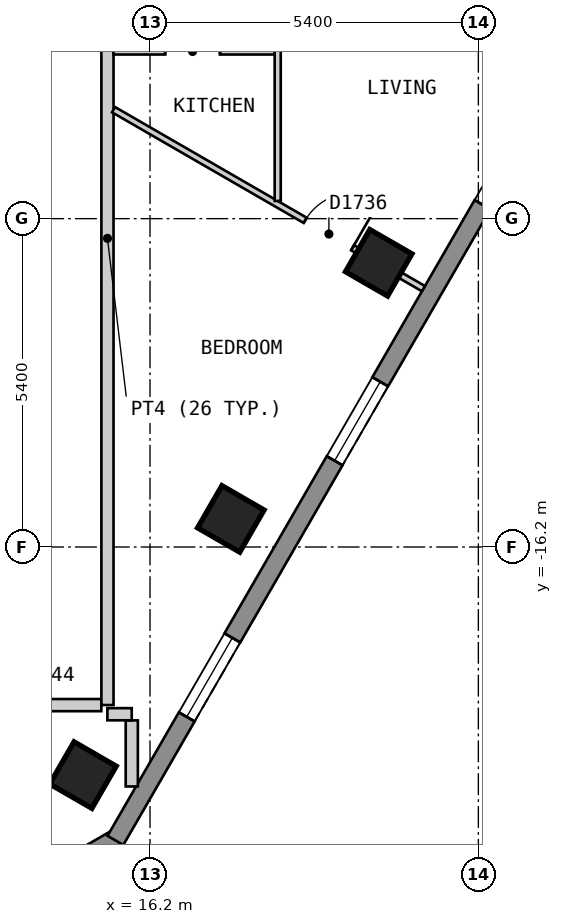
"""IFC4 building model, lengths in metres.
Left out: names, types, materials, properties, quantities, classifications, styles, units other than length and angle.
Written with IfcOpenShell. Run it as: python <this file> out.ifc"""

import sys

from ifc_helpers import new_model, si_unit, direction, frame, frame_2d, origin, origin_2d, place, context, subcontext, project, spatial, polyline, rectangle, outline, extrude, element, fill, save


model = new_model("IFC4")
c1 = context("Model", 3, precision=1e-05, world=origin(), true_north=direction((0.0, 1.0)))
c2 = subcontext(c1, "Body", "Model", "MODEL_VIEW")
j1 = project(units=[si_unit("LENGTHUNIT", "METRE"), si_unit("PLANEANGLEUNIT", "RADIAN")], contexts=[c1])
p1 = place(None, origin())
s1 = spatial("IfcSite", under=j1, at=p1, CompositionType="ELEMENT")
p2 = place(p1, origin())
s2 = spatial("IfcBuilding", under=s1, at=p2, CompositionType="ELEMENT")
p3 = place(p2, frame((0.0, 0.0, 187.2)))
s3 = spatial("IfcBuildingStorey", under=s2, at=p3, CompositionType="ELEMENT", Elevation=187.2)
for number, where, z_axis, x_axis in (
    (1, (15.097, -19.951, 0.0), (0.0, 0.0, 1.0), (0.5, 0.866, 0.0)),
    (2, (17.529, -15.738, 0.0), (0.0, 0.0, 1.0), (0.5, 0.866, 0.0)),
    (3, (19.961, -11.526, 0.0), (0.0, 0.0, 1.0), (0.5, 0.866, 0.0)),
):
    element("IfcColumn", number, at=place(p3, frame(where, z_axis=z_axis, x_axis=x_axis)), inside=s3, PredefinedType="COLUMN", context=c2, shape_type="SweptSolid", body=[
        extrude(rectangle(XDim=0.8, YDim=0.8, at=origin_2d()), origin(), (0.0, 0.0, 1.0), 3.0),
    ])
p4 = place(p3, frame((11.356, -23.47, 0.0), z_axis=(0.0, 0.0, 1.0), x_axis=(0.866022959057, 0.500004234368, 0.0)))
e4 = element("IfcWall", 4, at=p4, inside=s3, PredefinedType="SOLIDWALL", context=c2, shape_type="SweptSolid", body=[
    extrude(outline(polyline([(0.0, -0.15), (5.0, -0.15), (4.92, 0.15), (0.08, 0.15), (0.0, -0.15)])), origin(), (0.0, 0.0, 1.0), 2.7),
])
p5 = place(p4, frame((0.65, 0.0, 0.15)))
e5 = element("IfcOpeningElement", 5, at=p5, cuts=e4, PredefinedType="OPENING", context=c2, shape_type="SweptSolid", body=[
    extrude(rectangle(XDim=1.2, YDim=2.1, at=frame_2d((0.6, 1.05))), frame((0.0, 0.16, 0.0), z_axis=(0.0, -1.0, 0.0), x_axis=(1.0, 0.0, 0.0)), (0.0, 0.0, 1.0), 0.32),
])
p6 = place(p3, frame((15.631, -21.025, 0.0), z_axis=(0.0, 0.0, 1.0), x_axis=(0.500018670445, 0.86601462413, 0.0)))
e6 = element("IfcWall", 6, at=p6, inside=s3, PredefinedType="SOLIDWALL", context=c2, shape_type="SweptSolid", body=[
    extrude(outline(polyline([(0.0, -0.15), (20.785, -0.15), (20.705, 0.15), (0.08, 0.15), (0.0, -0.15)])), origin(), (0.0, 0.0, 1.0), 2.7),
])
p7 = place(p6, frame((2.346, 0.0, 0.15)))
e7 = element("IfcOpeningElement", 7, at=p7, cuts=e6, PredefinedType="OPENING", context=c2, shape_type="SweptSolid", body=[
    extrude(rectangle(XDim=1.5, YDim=2.1, at=frame_2d((0.75, 1.05))), frame((0.0, 0.16, 0.0), z_axis=(0.0, -1.0, 0.0), x_axis=(1.0, 0.0, 0.0)), (0.0, 0.0, 1.0), 0.32),
])
p8 = place(p6, frame((7.21, 0.0, 0.15)))
e8 = element("IfcOpeningElement", 8, at=p8, cuts=e6, PredefinedType="OPENING", context=c2, shape_type="SweptSolid", body=[
    extrude(rectangle(XDim=1.5, YDim=2.1, at=frame_2d((0.75, 1.05))), frame((0.0, 0.16, 0.0), z_axis=(0.0, -1.0, 0.0), x_axis=(1.0, 0.0, 0.0)), (0.0, 0.0, 1.0), 0.32),
])
p9 = place(p6, frame((12.073, 0.0, 0.15)))
e9 = element("IfcOpeningElement", 9, at=p9, cuts=e6, PredefinedType="OPENING", context=c2, shape_type="SweptSolid", body=[
    extrude(rectangle(XDim=1.5, YDim=2.1, at=frame_2d((0.75, 1.05))), frame((0.0, 0.16, 0.0), z_axis=(0.0, -1.0, 0.0), x_axis=(1.0, 0.0, 0.0)), (0.0, 0.0, 1.0), 0.32),
])
p10 = place(p6, frame((16.938, 0.0, 0.15)))
e10 = element("IfcOpeningElement", 10, at=p10, cuts=e6, PredefinedType="OPENING", context=c2, shape_type="SweptSolid", body=[
    extrude(rectangle(XDim=1.5, YDim=2.1, at=frame_2d((0.75, 1.05))), frame((0.0, 0.16, 0.0), z_axis=(0.0, -1.0, 0.0), x_axis=(1.0, 0.0, 0.0)), (0.0, 0.0, 1.0), 0.32),
])
p11 = place(p3, frame((13.3, -18.8, 0.0), z_axis=(0.0, 0.0, 1.0), x_axis=(1.0, 0.0, 0.0)))
e11 = element("IfcWall", 11, at=p11, inside=s3, PredefinedType="PARTITIONING", context=c2, shape_type="SweptSolid", body=[
    extrude(rectangle(XDim=2.099, YDim=0.2, at=frame_2d((1.049, 0.0))), origin(), (0.0, 0.0, 1.0), 2.7),
])
p12 = place(p11, frame((0.2, 0.0, 0.0)))
e12 = element("IfcOpeningElement", 12, at=p12, cuts=e11, PredefinedType="OPENING", context=c2, shape_type="SweptSolid", body=[
    extrude(rectangle(XDim=1.0, YDim=2.1, at=frame_2d((0.5, 1.05))), frame((0.0, 0.11, 0.0), z_axis=(0.0, -1.0, 0.0), x_axis=(1.0, 0.0, 0.0)), (0.0, 0.0, 1.0), 0.22),
])
p13 = place(p3, frame((15.5, -18.799, 0.0), z_axis=(0.0, 0.0, 1.0), x_axis=(0.0, 1.0, 0.0)))
e13 = element("IfcWall", 13, at=p13, inside=s3, PredefinedType="PARTITIONING", context=c2, shape_type="SweptSolid", body=[
    extrude(rectangle(XDim=15.349, YDim=0.2, at=frame_2d((7.675, 0.0))), origin(), (0.0, 0.0, 1.0), 2.7),
])
p14 = place(p13, frame((11.348, 0.0, 0.0)))
e14 = element("IfcOpeningElement", 14, at=p14, cuts=e13, PredefinedType="OPENING", context=c2, shape_type="SweptSolid", body=[
    extrude(rectangle(XDim=1.0, YDim=2.1, at=frame_2d((0.5, 1.05))), frame((0.0, 0.11, 0.0), z_axis=(0.0, -1.0, 0.0), x_axis=(1.0, 0.0, 0.0)), (0.0, 0.0, 1.0), 0.22),
])
p15 = place(p3, frame((15.6, -9.008, 0.0), z_axis=(0.0, 0.0, 1.0), x_axis=(0.866013576751, -0.500020484464, 0.0)))
e15 = element("IfcWall", 15, at=p15, inside=s3, PredefinedType="PARTITIONING", context=c2, shape_type="SweptSolid", body=[
    extrude(rectangle(XDim=5.885, YDim=0.1, at=frame_2d((2.943, 0.0))), origin(), (0.0, 0.0, 1.0), 2.7),
])
p16 = place(p15, frame((3.64, 0.0, 0.0)))
e16 = element("IfcOpeningElement", 16, at=p16, cuts=e15, PredefinedType="OPENING", context=c2, shape_type="SweptSolid", body=[
    extrude(rectangle(XDim=0.9, YDim=2.1, at=frame_2d((0.45, 1.05))), frame((0.0, 0.06, 0.0), z_axis=(0.0, -1.0, 0.0), x_axis=(1.0, 0.0, 0.0)), (0.0, 0.0, 1.0), 0.12),
])
p17 = place(p3, frame((15.6, -8.051, 0.0), z_axis=(0.0, 0.0, 1.0), x_axis=(1.0, 0.0, 0.0)))
e17 = element("IfcWall", 17, at=p17, inside=s3, PredefinedType="PARTITIONING", context=c2, shape_type="SweptSolid", body=[
    extrude(rectangle(XDim=2.65, YDim=0.1, at=frame_2d((1.325, 0.0))), origin(), (0.0, 0.0, 1.0), 2.7),
])
p18 = place(p17, frame((0.85, 0.0, 0.0)))
e18 = element("IfcOpeningElement", 18, at=p18, cuts=e17, PredefinedType="OPENING", context=c2, shape_type="SweptSolid", body=[
    extrude(rectangle(XDim=0.9, YDim=2.1, at=frame_2d((0.45, 1.05))), frame((0.0, 0.06, 0.0), z_axis=(0.0, -1.0, 0.0), x_axis=(1.0, 0.0, 0.0)), (0.0, 0.0, 1.0), 0.12),
])
p19 = place(p3, frame((18.3, -10.509, 0.0), z_axis=(0.0, 0.0, 1.0), x_axis=(0.0, 1.0, 0.0)))
e19 = element("IfcWall", 19, at=p19, inside=s3, PredefinedType="PARTITIONING", context=c2, shape_type="SweptSolid", body=[
    extrude(rectangle(XDim=5.443, YDim=0.1, at=frame_2d((2.722, 0.0))), origin(), (0.0, 0.0, 1.0), 2.7),
])
p20 = place(p19, frame((3.109, 0.0, 0.0)))
e20 = element("IfcOpeningElement", 20, at=p20, cuts=e19, PredefinedType="OPENING", context=c2, shape_type="SweptSolid", body=[
    extrude(rectangle(XDim=0.9, YDim=2.1, at=frame_2d((0.45, 1.05))), frame((0.0, 0.06, 0.0), z_axis=(0.0, -1.0, 0.0), x_axis=(1.0, 0.0, 0.0)), (0.0, 0.0, 1.0), 0.12),
])
p21 = place(p3, frame((15.9, -19.051, 0.0), z_axis=(0.0, 0.0, 1.0), x_axis=(0.0, -1.0, 0.0)))
e21 = element("IfcWall", 21, at=p21, inside=s3, PredefinedType="PARTITIONING", context=c2, shape_type="SweptSolid", body=[
    extrude(rectangle(XDim=1.087, YDim=0.2, at=frame_2d((0.543, 0.0))), origin(), (0.0, 0.0, 1.0), 2.7),
])
p22 = place(p3, frame((15.499, -18.95, 0.0), z_axis=(0.0, 0.0, 1.0), x_axis=(1.0, 0.0, 0.0)))
e22 = element("IfcWall", 22, at=p22, inside=s3, PredefinedType="PARTITIONING", context=c2, shape_type="SweptSolid", body=[
    extrude(rectangle(XDim=0.4, YDim=0.2, at=frame_2d((0.2, 0.0))), origin(), (0.0, 0.0, 1.0), 2.7),
])
p23 = place(p7, origin())
e23 = element("IfcWindow", 23, at=p23, inside=s3, PartitioningType="SINGLE_PANEL", PredefinedType="WINDOW", context=c2, shape_type="SweptSolid", body=[
    extrude(rectangle(XDim=1.5, YDim=2.1, at=frame_2d((0.75, 1.05))), frame((0.0, 0.03, 0.0), z_axis=(0.0, -1.0, 0.0), x_axis=(1.0, 0.0, 0.0)), (0.0, 0.0, 1.0), 0.06),
])
fill(e7, e23)
p24 = place(p8, origin())
e24 = element("IfcWindow", 24, at=p24, inside=s3, PartitioningType="SINGLE_PANEL", PredefinedType="WINDOW", context=c2, shape_type="SweptSolid", body=[
    extrude(rectangle(XDim=1.5, YDim=2.1, at=frame_2d((0.75, 1.05))), frame((0.0, 0.03, 0.0), z_axis=(0.0, -1.0, 0.0), x_axis=(1.0, 0.0, 0.0)), (0.0, 0.0, 1.0), 0.06),
])
fill(e8, e24)
p25 = place(p9, origin())
e25 = element("IfcWindow", 25, at=p25, inside=s3, PartitioningType="SINGLE_PANEL", PredefinedType="WINDOW", context=c2, shape_type="SweptSolid", body=[
    extrude(rectangle(XDim=1.5, YDim=2.1, at=frame_2d((0.75, 1.05))), frame((0.0, 0.03, 0.0), z_axis=(0.0, -1.0, 0.0), x_axis=(1.0, 0.0, 0.0)), (0.0, 0.0, 1.0), 0.06),
])
fill(e9, e25)
p26 = place(p18, origin())
e26 = element("IfcDoor", 26, at=p26, inside=s3, OperationType="SINGLE_SWING_RIGHT", PredefinedType="DOOR", context=c2, shape_type="SweptSolid", body=[
    extrude(rectangle(XDim=0.9, YDim=2.1, at=frame_2d((0.45, 1.05))), frame((0.0, 0.025, 0.0), z_axis=(0.0, -1.0, 0.0), x_axis=(1.0, 0.0, 0.0)), (0.0, 0.0, 1.0), 0.05),
])
fill(e18, e26)
p27 = place(p16, origin())
e27 = element("IfcDoor", 27, at=p27, inside=s3, OperationType="SINGLE_SWING_RIGHT", PredefinedType="DOOR", context=c2, shape_type="SweptSolid", body=[
    extrude(rectangle(XDim=0.9, YDim=2.1, at=frame_2d((0.45, 1.05))), frame((0.0, 0.025, 0.0), z_axis=(0.0, -1.0, 0.0), x_axis=(1.0, 0.0, 0.0)), (0.0, 0.0, 1.0), 0.05),
])
fill(e16, e27)
save(model, sys.argv[1])
